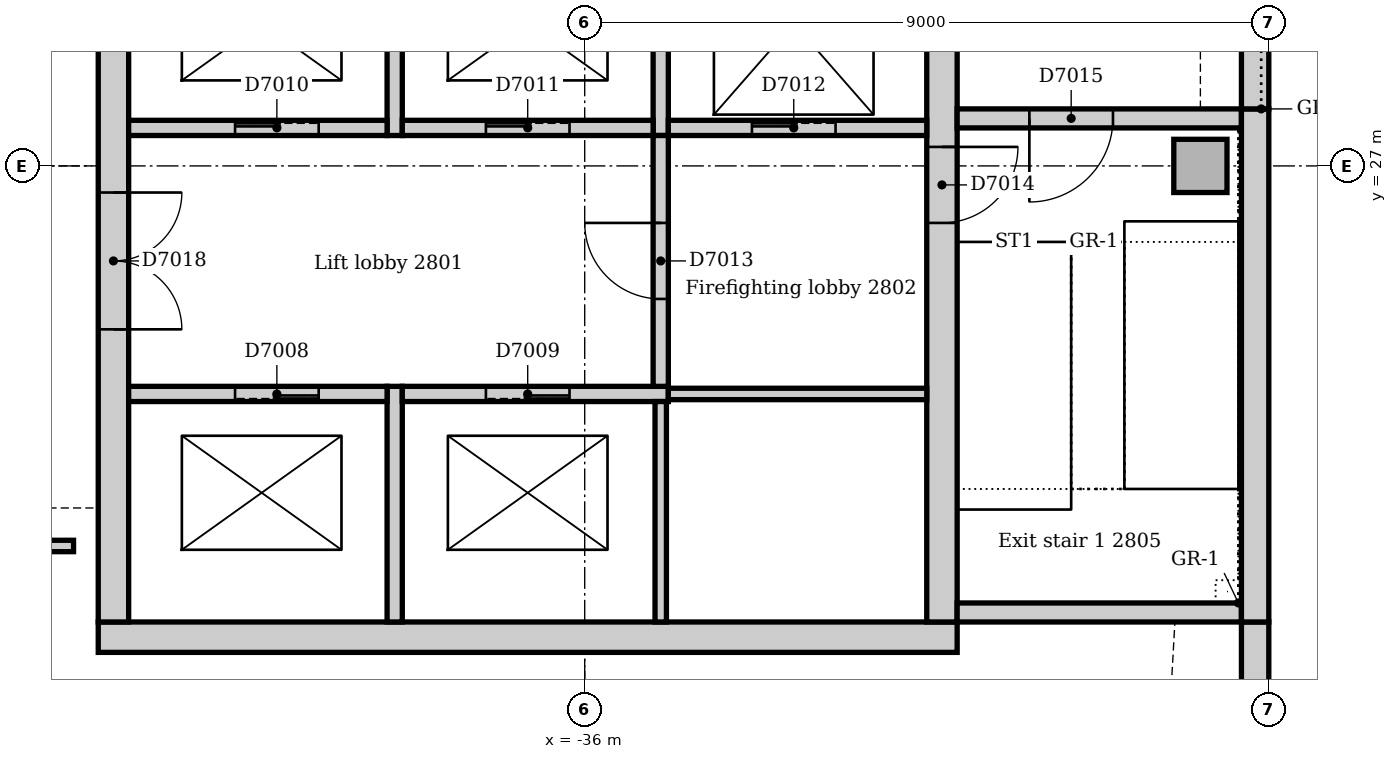
"""IFC4 building model, lengths in metres.
Left out: names, types, materials, properties, quantities, classifications, styles, units other than length and angle.
Written with IfcOpenShell. Run it as: python <this file> out.ifc"""

import sys

from ifc_helpers import new_model, si_unit, direction, frame, frame_2d, origin, origin_2d, place, context, subcontext, project, spatial, rectangle, extrude, element, fill, save


model = new_model("IFC4")
c1 = context("Model", 3, precision=1e-05, world=origin(), true_north=direction((0.0, 1.0)))
c2 = subcontext(c1, "Body", "Model", "MODEL_VIEW")
j1 = project(units=[si_unit("LENGTHUNIT", "METRE"), si_unit("PLANEANGLEUNIT", "RADIAN")], contexts=[c1])
p1 = place(None, origin())
s1 = spatial("IfcSite", under=j1, at=p1, CompositionType="ELEMENT")
p2 = place(p1, origin())
s2 = spatial("IfcBuilding", under=s1, at=p2, CompositionType="ELEMENT")
p3 = place(p2, frame((0.0, 0.0, 120.0)))
s3 = spatial("IfcBuildingStorey", under=s2, at=p3, CompositionType="ELEMENT", Elevation=120.0)
p4 = place(p3, frame((-42.4, 20.8, 0.0), z_axis=(0.0, 0.0, 1.0), x_axis=(1.0, 0.0, 0.0)))
e1 = element("IfcWall", 1, at=p4, inside=s3, PredefinedType="SOLIDWALL", context=c2, shape_type="SweptSolid", body=[
    extrude(rectangle(XDim=11.3, YDim=0.4, at=frame_2d((5.65, 0.0))), origin(), (0.0, 0.0, 1.0), 4.0),
])
p5 = place(p3, frame((-31.3, 21.0, 0.0), z_axis=(0.0, 0.0, 1.0), x_axis=(0.0, 1.0, 0.0)))
e2 = element("IfcWall", 2, at=p5, inside=s3, PredefinedType="SOLIDWALL", context=c2, shape_type="SweptSolid", body=[
    extrude(rectangle(XDim=9.5, YDim=0.4, at=frame_2d((4.75, 0.0))), origin(), (0.0, 0.0, 1.0), 4.0),
])
p6 = place(p5, frame((5.25, 0.0, 0.0)))
e3 = element("IfcOpeningElement", 3, at=p6, cuts=e2, PredefinedType="OPENING", context=c2, shape_type="SweptSolid", body=[
    extrude(rectangle(XDim=1.0, YDim=2.1, at=frame_2d((0.5, 1.05))), frame((0.0, 0.21, 0.0), z_axis=(0.0, -1.0, 0.0), x_axis=(1.0, 0.0, 0.0)), (0.0, 0.0, 1.0), 0.42),
])
p7 = place(p3, frame((-42.2, 30.5, 0.0), z_axis=(0.0, 0.0, 1.0), x_axis=(0.0, -1.0, 0.0)))
e4 = element("IfcWall", 4, at=p7, inside=s3, PredefinedType="SOLIDWALL", context=c2, shape_type="SweptSolid", body=[
    extrude(rectangle(XDim=9.5, YDim=0.4, at=frame_2d((4.75, 0.0))), origin(), (0.0, 0.0, 1.0), 4.0),
])
p8 = place(p7, frame((3.85, 0.0, 0.0)))
e5 = element("IfcOpeningElement", 5, at=p8, cuts=e4, PredefinedType="OPENING", context=c2, shape_type="SweptSolid", body=[
    extrude(rectangle(XDim=1.8, YDim=2.1, at=frame_2d((0.9, 1.05))), frame((0.0, 0.21, 0.0), z_axis=(0.0, -1.0, 0.0), x_axis=(1.0, 0.0, 0.0)), (0.0, 0.0, 1.0), 0.42),
])
p9 = place(p3, frame((-31.1, 21.125, 0.0), z_axis=(0.0, 0.0, 1.0), x_axis=(1.0, 0.0, 0.0)))
e6 = element("IfcWall", 6, at=p9, inside=s3, PredefinedType="SOLIDWALL", context=c2, shape_type="SweptSolid", body=[
    extrude(rectangle(XDim=3.74, YDim=0.25, at=frame_2d((1.87, 0.0))), origin(), (0.0, 0.0, 1.0), 4.0),
])
p10 = place(p3, frame((-27.36, 27.625, 0.0), z_axis=(0.0, 0.0, 1.0), x_axis=(-1.0, 0.0, 0.0)))
e7 = element("IfcWall", 7, at=p10, inside=s3, PredefinedType="SOLIDWALL", context=c2, shape_type="SweptSolid", body=[
    extrude(rectangle(XDim=3.74, YDim=0.25, at=frame_2d((1.87, 0.0))), origin(), (0.0, 0.0, 1.0), 4.0),
])
p11 = place(p10, frame((1.69, 0.0, 0.0)))
e8 = element("IfcOpeningElement", 8, at=p11, cuts=e7, PredefinedType="OPENING", context=c2, shape_type="SweptSolid", body=[
    extrude(rectangle(XDim=1.1, YDim=2.1, at=frame_2d((0.55, 1.05))), frame((0.0, 0.135, 0.0), z_axis=(0.0, -1.0, 0.0), x_axis=(1.0, 0.0, 0.0)), (0.0, 0.0, 1.0), 0.27),
])
p12 = place(p3, frame((-27.9, 27.0, 0.0), z_axis=(0.0, 0.0, 1.0), x_axis=(1.0, 0.0, 0.0)))
e9 = element("IfcColumn", 9, at=p12, inside=s3, PredefinedType="COLUMN", context=c2, shape_type="SweptSolid", body=[
    extrude(rectangle(XDim=0.7, YDim=0.7, at=origin_2d()), origin(), (0.0, 0.0, 1.0), 4.0),
])
p13 = place(p3, frame((-27.18, 17.743, 0.0), z_axis=(0.0, 0.0, 1.0), x_axis=(0.0, 1.0, 0.0)))
e10 = element("IfcWall", 10, at=p13, inside=s3, PredefinedType="STANDARD", context=c2, shape_type="SweptSolid", body=[
    extrude(rectangle(XDim=3.257, YDim=0.36, at=frame_2d((1.629, 0.0))), origin(), (0.0, 0.0, 1.0), 3.85),
])
p14 = place(p3, frame((-27.18, 21.0, 0.0), z_axis=(0.0, 0.0, 1.0), x_axis=(0.0, 1.0, 0.0)))
e11 = element("IfcWall", 11, at=p14, inside=s3, PredefinedType="STANDARD", context=c2, shape_type="SweptSolid", body=[
    extrude(rectangle(XDim=6.75, YDim=0.36, at=frame_2d((3.375, 0.0))), origin(), (0.0, 0.0, 1.0), 3.85),
])
p15 = place(p3, frame((-27.18, 27.75, 0.0), z_axis=(0.0, 0.0, 1.0), x_axis=(0.0, 1.0, 0.0)))
e12 = element("IfcWall", 12, at=p15, inside=s3, PredefinedType="STANDARD", context=c2, shape_type="SweptSolid", body=[
    extrude(rectangle(XDim=7.5, YDim=0.36, at=frame_2d((3.75, 0.0))), origin(), (0.0, 0.0, 1.0), 3.85),
])
p16 = place(p15, frame((2.85, 0.0, 1.2)))
e13 = element("IfcOpeningElement", 13, at=p16, cuts=e12, PredefinedType="OPENING", context=c2, shape_type="SweptSolid", body=[
    extrude(rectangle(XDim=1.8, YDim=1.2, at=frame_2d((0.9, 0.6))), frame((0.0, 0.19, 0.0), z_axis=(0.0, -1.0, 0.0), x_axis=(1.0, 0.0, 0.0)), (0.0, 0.0, 1.0), 0.38),
])
p17 = place(p3, frame((-38.5, 21.0, 0.0), z_axis=(0.0, 0.0, 1.0), x_axis=(0.0, 1.0, 0.0)))
e14 = element("IfcWall", 14, at=p17, inside=s3, PredefinedType="SOLIDWALL", context=c2, shape_type="SweptSolid", body=[
    extrude(rectangle(XDim=3.1, YDim=0.2, at=frame_2d((1.55, 0.0))), origin(), (0.0, 0.0, 1.0), 4.0),
])
p18 = place(p3, frame((-38.6, 24.0, 0.0), z_axis=(0.0, 0.0, 1.0), x_axis=(-1.0, 0.0, 0.0)))
e15 = element("IfcWall", 15, at=p18, inside=s3, PredefinedType="SOLIDWALL", context=c2, shape_type="SweptSolid", body=[
    extrude(rectangle(XDim=3.4, YDim=0.2, at=frame_2d((1.7, 0.0))), origin(), (0.0, 0.0, 1.0), 4.0),
])
p19 = place(p18, frame((0.9, 0.0, 0.0)))
e16 = element("IfcOpeningElement", 16, at=p19, cuts=e15, PredefinedType="OPENING", context=c2, shape_type="SweptSolid", body=[
    extrude(rectangle(XDim=1.1, YDim=2.1, at=frame_2d((0.55, 1.05))), frame((0.0, 0.11, 0.0), z_axis=(0.0, -1.0, 0.0), x_axis=(1.0, 0.0, 0.0)), (0.0, 0.0, 1.0), 0.22),
])
p20 = place(p3, frame((-34.9, 24.0, 0.0), z_axis=(0.0, 0.0, 1.0), x_axis=(-1.0, 0.0, 0.0)))
e17 = element("IfcWall", 17, at=p20, inside=s3, PredefinedType="SOLIDWALL", context=c2, shape_type="SweptSolid", body=[
    extrude(rectangle(XDim=3.5, YDim=0.2, at=frame_2d((1.75, 0.0))), origin(), (0.0, 0.0, 1.0), 4.0),
])
p21 = place(p20, frame((1.3, 0.0, 0.0)))
e18 = element("IfcOpeningElement", 18, at=p21, cuts=e17, PredefinedType="OPENING", context=c2, shape_type="SweptSolid", body=[
    extrude(rectangle(XDim=1.1, YDim=2.1, at=frame_2d((0.55, 1.05))), frame((0.0, 0.11, 0.0), z_axis=(0.0, -1.0, 0.0), x_axis=(1.0, 0.0, 0.0)), (0.0, 0.0, 1.0), 0.22),
])
p22 = place(p3, frame((-38.5, 27.4, 0.0), z_axis=(0.0, 0.0, 1.0), x_axis=(0.0, 1.0, 0.0)))
e19 = element("IfcWall", 19, at=p22, inside=s3, PredefinedType="SOLIDWALL", context=c2, shape_type="SweptSolid", body=[
    extrude(rectangle(XDim=2.85, YDim=0.2, at=frame_2d((1.425, 0.0))), origin(), (0.0, 0.0, 1.0), 4.0),
])
p23 = place(p3, frame((-42.0, 27.5, 0.0), z_axis=(0.0, 0.0, 1.0), x_axis=(1.0, 0.0, 0.0)))
e20 = element("IfcWall", 20, at=p23, inside=s3, PredefinedType="SOLIDWALL", context=c2, shape_type="SweptSolid", body=[
    extrude(rectangle(XDim=3.4, YDim=0.2, at=frame_2d((1.7, 0.0))), origin(), (0.0, 0.0, 1.0), 4.0),
])
p24 = place(p23, frame((1.4, 0.0, 0.0)))
e21 = element("IfcOpeningElement", 21, at=p24, cuts=e20, PredefinedType="OPENING", context=c2, shape_type="SweptSolid", body=[
    extrude(rectangle(XDim=1.1, YDim=2.1, at=frame_2d((0.55, 1.05))), frame((0.0, 0.11, 0.0), z_axis=(0.0, -1.0, 0.0), x_axis=(1.0, 0.0, 0.0)), (0.0, 0.0, 1.0), 0.22),
])
p25 = place(p3, frame((-35.0, 27.4, 0.0), z_axis=(0.0, 0.0, 1.0), x_axis=(0.0, 1.0, 0.0)))
e22 = element("IfcWall", 22, at=p25, inside=s3, PredefinedType="SOLIDWALL", context=c2, shape_type="SweptSolid", body=[
    extrude(rectangle(XDim=2.85, YDim=0.2, at=frame_2d((1.425, 0.0))), origin(), (0.0, 0.0, 1.0), 4.0),
])
p26 = place(p3, frame((-38.4, 27.5, 0.0), z_axis=(0.0, 0.0, 1.0), x_axis=(1.0, 0.0, 0.0)))
e23 = element("IfcWall", 23, at=p26, inside=s3, PredefinedType="SOLIDWALL", context=c2, shape_type="SweptSolid", body=[
    extrude(rectangle(XDim=3.3, YDim=0.2, at=frame_2d((1.65, 0.0))), origin(), (0.0, 0.0, 1.0), 4.0),
])
p27 = place(p26, frame((1.1, 0.0, 0.0)))
e24 = element("IfcOpeningElement", 24, at=p27, cuts=e23, PredefinedType="OPENING", context=c2, shape_type="SweptSolid", body=[
    extrude(rectangle(XDim=1.1, YDim=2.1, at=frame_2d((0.55, 1.05))), frame((0.0, 0.11, 0.0), z_axis=(0.0, -1.0, 0.0), x_axis=(1.0, 0.0, 0.0)), (0.0, 0.0, 1.0), 0.22),
])
p28 = place(p3, frame((-34.9, 27.5, 0.0), z_axis=(0.0, 0.0, 1.0), x_axis=(1.0, 0.0, 0.0)))
e25 = element("IfcWall", 25, at=p28, inside=s3, PredefinedType="SOLIDWALL", context=c2, shape_type="SweptSolid", body=[
    extrude(rectangle(XDim=3.4, YDim=0.2, at=frame_2d((1.7, 0.0))), origin(), (0.0, 0.0, 1.0), 4.0),
])
p29 = place(p28, frame((1.1, 0.0, 0.0)))
e26 = element("IfcOpeningElement", 26, at=p29, cuts=e25, PredefinedType="OPENING", context=c2, shape_type="SweptSolid", body=[
    extrude(rectangle(XDim=1.1, YDim=2.1, at=frame_2d((0.55, 1.05))), frame((0.0, 0.11, 0.0), z_axis=(0.0, -1.0, 0.0), x_axis=(1.0, 0.0, 0.0)), (0.0, 0.0, 1.0), 0.22),
])
p30 = place(p3, frame((-35.0, 24.1, 0.0), z_axis=(0.0, 0.0, 1.0), x_axis=(0.0, 1.0, 0.0)))
e27 = element("IfcWall", 27, at=p30, inside=s3, PredefinedType="SOLIDWALL", context=c2, shape_type="SweptSolid", body=[
    extrude(rectangle(XDim=3.3, YDim=0.2, at=frame_2d((1.65, 0.0))), origin(), (0.0, 0.0, 1.0), 4.0),
])
p31 = place(p30, frame((1.15, 0.0, 0.0)))
e28 = element("IfcOpeningElement", 28, at=p31, cuts=e27, PredefinedType="OPENING", context=c2, shape_type="SweptSolid", body=[
    extrude(rectangle(XDim=1.0, YDim=2.1, at=frame_2d((0.5, 1.05))), frame((0.0, 0.11, 0.0), z_axis=(0.0, -1.0, 0.0), x_axis=(1.0, 0.0, 0.0)), (0.0, 0.0, 1.0), 0.22),
])
p32 = place(p3, frame((-35.0, 21.0, 0.0), z_axis=(0.0, 0.0, 1.0), x_axis=(0.0, 1.0, 0.0)))
e29 = element("IfcWall", 29, at=p32, inside=s3, PredefinedType="SOLIDWALL", context=c2, shape_type="SweptSolid", body=[
    extrude(rectangle(XDim=2.9, YDim=0.15, at=frame_2d((1.45, 0.0))), origin(), (0.0, 0.0, 1.0), 4.0),
])
p33 = place(p3, frame((-31.5, 24.0, 0.0), z_axis=(0.0, 0.0, 1.0), x_axis=(-1.0, 0.0, 0.0)))
e30 = element("IfcWall", 30, at=p33, inside=s3, PredefinedType="SOLIDWALL", context=c2, shape_type="SweptSolid", body=[
    extrude(rectangle(XDim=3.4, YDim=0.15, at=frame_2d((1.7, 0.0))), origin(), (0.0, 0.0, 1.0), 4.0),
])
p34 = place(p3, frame((-59.766, 22.0, 0.0), z_axis=(0.0, 0.0, 1.0), x_axis=(1.0, 0.0, 0.0)))
e31 = element("IfcWall", 31, at=p34, inside=s3, PredefinedType="PARTITIONING", context=c2, shape_type="SweptSolid", body=[
    extrude(rectangle(XDim=17.041, YDim=0.15, at=frame_2d((8.52, 0.0))), origin(), (0.0, 0.0, 1.0), 3.85),
])
p35 = place(p34, frame((15.366, 0.0, 0.0)))
e32 = element("IfcOpeningElement", 32, at=p35, cuts=e31, PredefinedType="OPENING", context=c2, shape_type="SweptSolid", body=[
    extrude(rectangle(XDim=0.9, YDim=2.1, at=frame_2d((0.45, 1.05))), frame((0.0, 0.085, 0.0), z_axis=(0.0, -1.0, 0.0), x_axis=(1.0, 0.0, 0.0)), (0.0, 0.0, 1.0), 0.17),
])
p36 = place(p34, frame((2.5, 0.0, 0.0)))
e33 = element("IfcOpeningElement", 33, at=p36, cuts=e31, PredefinedType="OPENING", context=c2, shape_type="SweptSolid", body=[
    extrude(rectangle(XDim=0.9, YDim=2.1, at=frame_2d((0.45, 1.05))), frame((0.0, 0.085, 0.0), z_axis=(0.0, -1.0, 0.0), x_axis=(1.0, 0.0, 0.0)), (0.0, 0.0, 1.0), 0.17),
])
p37 = place(p34, frame((9.056, 0.0, 0.0)))
e34 = element("IfcOpeningElement", 34, at=p37, cuts=e31, PredefinedType="OPENING", context=c2, shape_type="SweptSolid", body=[
    extrude(rectangle(XDim=1.0, YDim=2.1, at=frame_2d((0.5, 1.05))), frame((0.0, 0.085, 0.0), z_axis=(0.0, -1.0, 0.0), x_axis=(1.0, 0.0, 0.0)), (0.0, 0.0, 1.0), 0.17),
])
p38 = place(p19, origin())
e35 = element("IfcDoor", 35, at=p38, inside=s3, OperationType="SLIDING_TO_LEFT", PredefinedType="DOOR", context=c2, shape_type="SweptSolid", body=[
    extrude(rectangle(XDim=1.1, YDim=2.1, at=frame_2d((0.55, 1.05))), frame((0.0, 0.025, 0.0), z_axis=(0.0, -1.0, 0.0), x_axis=(1.0, 0.0, 0.0)), (0.0, 0.0, 1.0), 0.05),
])
fill(e16, e35)
p39 = place(p21, origin())
e36 = element("IfcDoor", 36, at=p39, inside=s3, OperationType="SLIDING_TO_LEFT", PredefinedType="DOOR", context=c2, shape_type="SweptSolid", body=[
    extrude(rectangle(XDim=1.1, YDim=2.1, at=frame_2d((0.55, 1.05))), frame((0.0, 0.025, 0.0), z_axis=(0.0, -1.0, 0.0), x_axis=(1.0, 0.0, 0.0)), (0.0, 0.0, 1.0), 0.05),
])
fill(e18, e36)
p40 = place(p24, origin())
e37 = element("IfcDoor", 37, at=p40, inside=s3, OperationType="SLIDING_TO_LEFT", PredefinedType="DOOR", context=c2, shape_type="SweptSolid", body=[
    extrude(rectangle(XDim=1.1, YDim=2.1, at=frame_2d((0.55, 1.05))), frame((0.0, 0.025, 0.0), z_axis=(0.0, -1.0, 0.0), x_axis=(1.0, 0.0, 0.0)), (0.0, 0.0, 1.0), 0.05),
])
fill(e21, e37)
p41 = place(p27, origin())
e38 = element("IfcDoor", 38, at=p41, inside=s3, OperationType="SLIDING_TO_LEFT", PredefinedType="DOOR", context=c2, shape_type="SweptSolid", body=[
    extrude(rectangle(XDim=1.1, YDim=2.1, at=frame_2d((0.55, 1.05))), frame((0.0, 0.025, 0.0), z_axis=(0.0, -1.0, 0.0), x_axis=(1.0, 0.0, 0.0)), (0.0, 0.0, 1.0), 0.05),
])
fill(e24, e38)
p42 = place(p29, origin())
e39 = element("IfcDoor", 39, at=p42, inside=s3, OperationType="SLIDING_TO_LEFT", PredefinedType="DOOR", context=c2, shape_type="SweptSolid", body=[
    extrude(rectangle(XDim=1.1, YDim=2.1, at=frame_2d((0.55, 1.05))), frame((0.0, 0.025, 0.0), z_axis=(0.0, -1.0, 0.0), x_axis=(1.0, 0.0, 0.0)), (0.0, 0.0, 1.0), 0.05),
])
fill(e26, e39)
p43 = place(p31, origin())
e40 = element("IfcDoor", 40, at=p43, inside=s3, OperationType="SINGLE_SWING_RIGHT", PredefinedType="DOOR", context=c2, shape_type="SweptSolid", body=[
    extrude(rectangle(XDim=1.0, YDim=2.1, at=frame_2d((0.5, 1.05))), frame((0.0, 0.025, 0.0), z_axis=(0.0, -1.0, 0.0), x_axis=(1.0, 0.0, 0.0)), (0.0, 0.0, 1.0), 0.05),
])
fill(e28, e40)
p44 = place(p6, frame((1.0, 0.0, 0.0), z_axis=(0.0, 0.0, 1.0), x_axis=(-1.0, 0.0, 0.0)))
e41 = element("IfcDoor", 41, at=p44, inside=s3, OperationType="SINGLE_SWING_LEFT", PredefinedType="DOOR", context=c2, shape_type="SweptSolid", body=[
    extrude(rectangle(XDim=1.0, YDim=2.1, at=frame_2d((0.5, 1.05))), frame((0.0, 0.025, 0.0), z_axis=(0.0, -1.0, 0.0), x_axis=(1.0, 0.0, 0.0)), (0.0, 0.0, 1.0), 0.05),
])
fill(e3, e41)
p45 = place(p11, origin())
e42 = element("IfcDoor", 42, at=p45, inside=s3, OperationType="SINGLE_SWING_RIGHT", PredefinedType="DOOR", context=c2, shape_type="SweptSolid", body=[
    extrude(rectangle(XDim=1.1, YDim=2.1, at=frame_2d((0.55, 1.05))), frame((0.0, 0.025, 0.0), z_axis=(0.0, -1.0, 0.0), x_axis=(1.0, 0.0, 0.0)), (0.0, 0.0, 1.0), 0.05),
])
fill(e8, e42)
p46 = place(p8, origin())
e43 = element("IfcDoor", 43, at=p46, inside=s3, OperationType="DOUBLE_DOOR_SINGLE_SWING", PredefinedType="DOOR", context=c2, shape_type="SweptSolid", body=[
    extrude(rectangle(XDim=1.8, YDim=2.1, at=frame_2d((0.9, 1.05))), frame((0.0, 0.025, 0.0), z_axis=(0.0, -1.0, 0.0), x_axis=(1.0, 0.0, 0.0)), (0.0, 0.0, 1.0), 0.05),
])
fill(e5, e43)
save(model, sys.argv[1])
